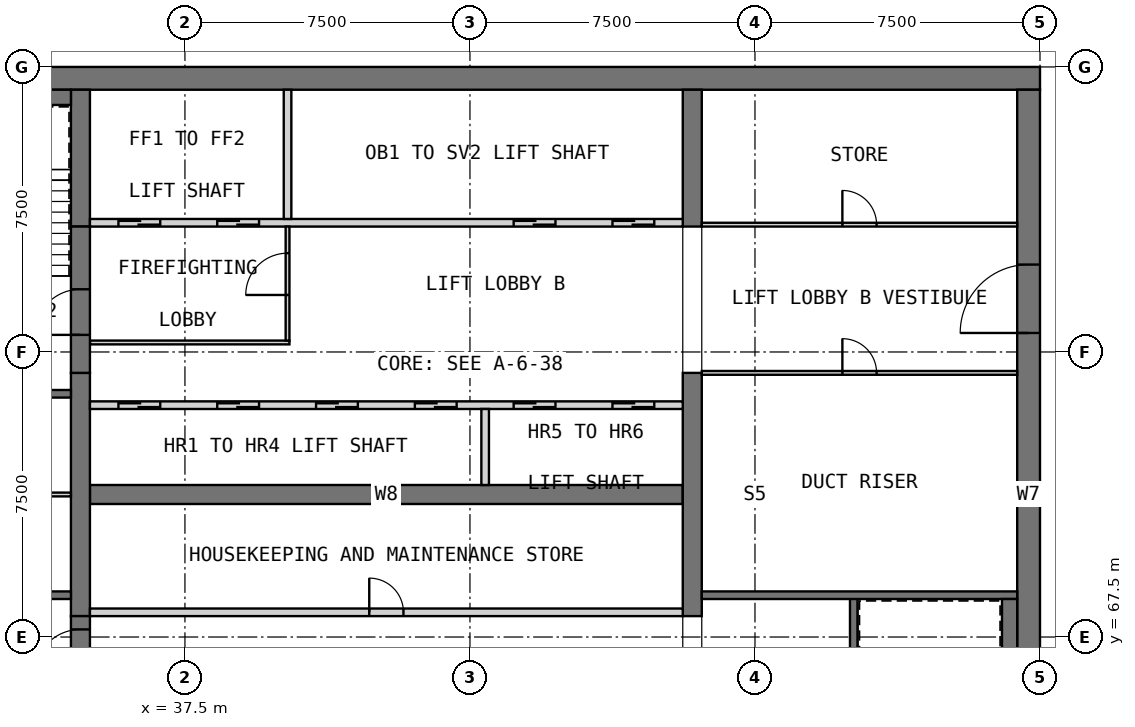
"""IFC4 building model, lengths in metres.
Left out: names, types, materials, properties, quantities, classifications, styles, units other than length and angle.
Written with IfcOpenShell. Run it as: python <this file> out.ifc"""

import sys

from ifc_helpers import new_model, si_unit, direction, frame, frame_2d, origin, place, context, subcontext, project, spatial, rectangle, extrude, element, fill, save


model = new_model("IFC4")
c1 = context("Model", 3, precision=1e-05, world=origin(), true_north=direction((0.0, 1.0)))
c2 = subcontext(c1, "Body", "Model", "MODEL_VIEW")
j1 = project(units=[si_unit("LENGTHUNIT", "METRE"), si_unit("PLANEANGLEUNIT", "RADIAN")], contexts=[c1])
p1 = place(None, origin())
s1 = spatial("IfcSite", under=j1, at=p1, CompositionType="ELEMENT")
p2 = place(p1, origin())
s2 = spatial("IfcBuilding", under=s1, at=p2, CompositionType="ELEMENT")
p3 = place(p2, frame((0.0, 0.0, 269.7)))
s3 = spatial("IfcBuildingStorey", under=s2, at=p3, CompositionType="ELEMENT", Elevation=269.7)
p4 = place(p3, frame((30.0, 82.2, 0.0), z_axis=(0.0, 0.0, 1.0), x_axis=(1.0, 0.0, 0.0)))
e1 = element("IfcWall", 1, at=p4, inside=s3, PredefinedType="SHEAR", context=c2, shape_type="SweptSolid", body=[
    extrude(rectangle(XDim=30.0, YDim=0.6, at=frame_2d((15.0, 0.0))), origin(), (0.0, 0.0, 1.0), 3.5),
])
p5 = place(p3, frame((59.7, 60.6, 0.0), z_axis=(0.0, 0.0, 1.0), x_axis=(0.0, 1.0, 0.0)))
e2 = element("IfcWall", 2, at=p5, inside=s3, PredefinedType="SHEAR", context=c2, shape_type="SweptSolid", body=[
    extrude(rectangle(XDim=21.3, YDim=0.6, at=frame_2d((10.65, 0.0))), origin(), (0.0, 0.0, 1.0), 3.5),
])
p6 = place(p5, frame((14.9, 0.0, 0.0)))
e3 = element("IfcOpeningElement", 3, at=p6, cuts=e2, PredefinedType="OPENING", context=c2, shape_type="SweptSolid", body=[
    extrude(rectangle(XDim=1.8, YDim=2.1, at=frame_2d((0.9, 1.05))), frame((0.0, 0.31, 0.0), z_axis=(0.0, -1.0, 0.0), x_axis=(1.0, 0.0, 0.0)), (0.0, 0.0, 1.0), 0.62),
])
p7 = place(p3, frame((35.0, 71.25, 0.0), z_axis=(0.0, 0.0, 1.0), x_axis=(1.0, 0.0, 0.0)))
e4 = element("IfcWall", 4, at=p7, inside=s3, PredefinedType="SHEAR", context=c2, shape_type="SweptSolid", body=[
    extrude(rectangle(XDim=15.6, YDim=0.5, at=frame_2d((7.8, 0.0))), origin(), (0.0, 0.0, 1.0), 3.5),
])
p8 = place(p3, frame((34.75, 68.05, 0.0), z_axis=(0.0, 0.0, 1.0), x_axis=(0.0, 1.0, 0.0)))
e5 = element("IfcWall", 5, at=p8, inside=s3, PredefinedType="SHEAR", context=c2, shape_type="SweptSolid", body=[
    extrude(rectangle(XDim=6.4, YDim=0.5, at=frame_2d((3.2, 0.0))), origin(), (0.0, 0.0, 1.0), 3.5),
])
p9 = place(p3, frame((34.75, 78.3, 0.0), z_axis=(0.0, 0.0, 1.0), x_axis=(0.0, 1.0, 0.0)))
e6 = element("IfcWall", 6, at=p9, inside=s3, PredefinedType="SHEAR", context=c2, shape_type="SweptSolid", body=[
    extrude(rectangle(XDim=3.6, YDim=0.5, at=frame_2d((1.8, 0.0))), origin(), (0.0, 0.0, 1.0), 3.5),
])
p10 = place(p3, frame((50.85, 68.05, 0.0), z_axis=(0.0, 0.0, 1.0), x_axis=(0.0, 1.0, 0.0)))
e7 = element("IfcWall", 7, at=p10, inside=s3, PredefinedType="SHEAR", context=c2, shape_type="SweptSolid", body=[
    extrude(rectangle(XDim=6.4, YDim=0.5, at=frame_2d((3.2, 0.0))), origin(), (0.0, 0.0, 1.0), 3.5),
])
p11 = place(p3, frame((50.85, 78.3, 0.0), z_axis=(0.0, 0.0, 1.0), x_axis=(0.0, 1.0, 0.0)))
e8 = element("IfcWall", 8, at=p11, inside=s3, PredefinedType="SHEAR", context=c2, shape_type="SweptSolid", body=[
    extrude(rectangle(XDim=3.6, YDim=0.5, at=frame_2d((1.8, 0.0))), origin(), (0.0, 0.0, 1.0), 3.5),
])
p12 = place(p3, frame((35.0, 68.15, 0.0), z_axis=(0.0, 0.0, 1.0), x_axis=(1.0, 0.0, 0.0)))
e9 = element("IfcWall", 9, at=p12, inside=s3, PredefinedType="PARTITIONING", context=c2, shape_type="SweptSolid", body=[
    extrude(rectangle(XDim=15.6, YDim=0.2, at=frame_2d((7.8, 0.0))), origin(), (0.0, 0.0, 1.0), 3.25),
])
p13 = place(p12, frame((7.35, 0.0, 0.0)))
e10 = element("IfcOpeningElement", 10, at=p13, cuts=e9, PredefinedType="OPENING", context=c2, shape_type="SweptSolid", body=[
    extrude(rectangle(XDim=0.9, YDim=2.1, at=frame_2d((0.45, 1.05))), frame((0.0, 0.11, 0.0), z_axis=(0.0, -1.0, 0.0), x_axis=(1.0, 0.0, 0.0)), (0.0, 0.0, 1.0), 0.22),
])
p14 = place(p3, frame((35.0, 73.6, 0.0), z_axis=(0.0, 0.0, 1.0), x_axis=(1.0, 0.0, 0.0)))
e11 = element("IfcWall", 11, at=p14, inside=s3, PredefinedType="SOLIDWALL", context=c2, shape_type="SweptSolid", body=[
    extrude(rectangle(XDim=15.6, YDim=0.2, at=frame_2d((7.8, 0.0))), origin(), (0.0, 0.0, 1.0), 3.5),
])
p15 = place(p14, frame((0.75, 0.0, 0.0)))
e12 = element("IfcOpeningElement", 12, at=p15, cuts=e11, PredefinedType="OPENING", context=c2, shape_type="SweptSolid", body=[
    extrude(rectangle(XDim=1.1, YDim=2.1, at=frame_2d((0.55, 1.05))), frame((0.0, 0.11, 0.0), z_axis=(0.0, -1.0, 0.0), x_axis=(1.0, 0.0, 0.0)), (0.0, 0.0, 1.0), 0.22),
])
p16 = place(p14, frame((3.35, 0.0, 0.0)))
e13 = element("IfcOpeningElement", 13, at=p16, cuts=e11, PredefinedType="OPENING", context=c2, shape_type="SweptSolid", body=[
    extrude(rectangle(XDim=1.1, YDim=2.1, at=frame_2d((0.55, 1.05))), frame((0.0, 0.11, 0.0), z_axis=(0.0, -1.0, 0.0), x_axis=(1.0, 0.0, 0.0)), (0.0, 0.0, 1.0), 0.22),
])
p17 = place(p14, frame((5.95, 0.0, 0.0)))
e14 = element("IfcOpeningElement", 14, at=p17, cuts=e11, PredefinedType="OPENING", context=c2, shape_type="SweptSolid", body=[
    extrude(rectangle(XDim=1.1, YDim=2.1, at=frame_2d((0.55, 1.05))), frame((0.0, 0.11, 0.0), z_axis=(0.0, -1.0, 0.0), x_axis=(1.0, 0.0, 0.0)), (0.0, 0.0, 1.0), 0.22),
])
p18 = place(p14, frame((8.55, 0.0, 0.0)))
e15 = element("IfcOpeningElement", 15, at=p18, cuts=e11, PredefinedType="OPENING", context=c2, shape_type="SweptSolid", body=[
    extrude(rectangle(XDim=1.1, YDim=2.1, at=frame_2d((0.55, 1.05))), frame((0.0, 0.11, 0.0), z_axis=(0.0, -1.0, 0.0), x_axis=(1.0, 0.0, 0.0)), (0.0, 0.0, 1.0), 0.22),
])
p19 = place(p14, frame((11.15, 0.0, 0.0)))
e16 = element("IfcOpeningElement", 16, at=p19, cuts=e11, PredefinedType="OPENING", context=c2, shape_type="SweptSolid", body=[
    extrude(rectangle(XDim=1.1, YDim=2.1, at=frame_2d((0.55, 1.05))), frame((0.0, 0.11, 0.0), z_axis=(0.0, -1.0, 0.0), x_axis=(1.0, 0.0, 0.0)), (0.0, 0.0, 1.0), 0.22),
])
p20 = place(p14, frame((13.75, 0.0, 0.0)))
e17 = element("IfcOpeningElement", 17, at=p20, cuts=e11, PredefinedType="OPENING", context=c2, shape_type="SweptSolid", body=[
    extrude(rectangle(XDim=1.1, YDim=2.1, at=frame_2d((0.55, 1.05))), frame((0.0, 0.11, 0.0), z_axis=(0.0, -1.0, 0.0), x_axis=(1.0, 0.0, 0.0)), (0.0, 0.0, 1.0), 0.22),
])
p21 = place(p3, frame((45.4, 71.5, 0.0), z_axis=(0.0, 0.0, 1.0), x_axis=(0.0, 1.0, 0.0)))
e18 = element("IfcWall", 18, at=p21, inside=s3, PredefinedType="SOLIDWALL", context=c2, shape_type="SweptSolid", body=[
    extrude(rectangle(XDim=2.0, YDim=0.2, at=frame_2d((1.0, 0.0))), origin(), (0.0, 0.0, 1.0), 3.5),
])
p22 = place(p3, frame((35.0, 78.4, 0.0), z_axis=(0.0, 0.0, 1.0), x_axis=(1.0, 0.0, 0.0)))
e19 = element("IfcWall", 19, at=p22, inside=s3, PredefinedType="SOLIDWALL", context=c2, shape_type="SweptSolid", body=[
    extrude(rectangle(XDim=15.6, YDim=0.2, at=frame_2d((7.8, 0.0))), origin(), (0.0, 0.0, 1.0), 3.5),
])
p23 = place(p22, frame((0.75, 0.0, 0.0)))
e20 = element("IfcOpeningElement", 20, at=p23, cuts=e19, PredefinedType="OPENING", context=c2, shape_type="SweptSolid", body=[
    extrude(rectangle(XDim=1.1, YDim=2.1, at=frame_2d((0.55, 1.05))), frame((0.0, 0.11, 0.0), z_axis=(0.0, -1.0, 0.0), x_axis=(1.0, 0.0, 0.0)), (0.0, 0.0, 1.0), 0.22),
])
p24 = place(p22, frame((3.35, 0.0, 0.0)))
e21 = element("IfcOpeningElement", 21, at=p24, cuts=e19, PredefinedType="OPENING", context=c2, shape_type="SweptSolid", body=[
    extrude(rectangle(XDim=1.1, YDim=2.1, at=frame_2d((0.55, 1.05))), frame((0.0, 0.11, 0.0), z_axis=(0.0, -1.0, 0.0), x_axis=(1.0, 0.0, 0.0)), (0.0, 0.0, 1.0), 0.22),
])
p25 = place(p22, frame((11.15, 0.0, 0.0)))
e22 = element("IfcOpeningElement", 22, at=p25, cuts=e19, PredefinedType="OPENING", context=c2, shape_type="SweptSolid", body=[
    extrude(rectangle(XDim=1.1, YDim=2.1, at=frame_2d((0.55, 1.05))), frame((0.0, 0.11, 0.0), z_axis=(0.0, -1.0, 0.0), x_axis=(1.0, 0.0, 0.0)), (0.0, 0.0, 1.0), 0.22),
])
p26 = place(p22, frame((13.75, 0.0, 0.0)))
e23 = element("IfcOpeningElement", 23, at=p26, cuts=e19, PredefinedType="OPENING", context=c2, shape_type="SweptSolid", body=[
    extrude(rectangle(XDim=1.1, YDim=2.1, at=frame_2d((0.55, 1.05))), frame((0.0, 0.11, 0.0), z_axis=(0.0, -1.0, 0.0), x_axis=(1.0, 0.0, 0.0)), (0.0, 0.0, 1.0), 0.22),
])
p27 = place(p3, frame((40.2, 78.5, 0.0), z_axis=(0.0, 0.0, 1.0), x_axis=(0.0, 1.0, 0.0)))
e24 = element("IfcWall", 24, at=p27, inside=s3, PredefinedType="SOLIDWALL", context=c2, shape_type="SweptSolid", body=[
    extrude(rectangle(XDim=3.4, YDim=0.2, at=frame_2d((1.7, 0.0))), origin(), (0.0, 0.0, 1.0), 3.5),
])
p28 = place(p3, frame((35.0, 75.25, 0.0), z_axis=(0.0, 0.0, 1.0), x_axis=(1.0, 0.0, 0.0)))
e25 = element("IfcWall", 25, at=p28, inside=s3, PredefinedType="PARTITIONING", context=c2, shape_type="SweptSolid", body=[
    extrude(rectangle(XDim=5.25, YDim=0.1, at=frame_2d((2.625, 0.0))), origin(), (0.0, 0.0, 1.0), 3.25),
])
p29 = place(p3, frame((40.2, 75.3, 0.0), z_axis=(0.0, 0.0, 1.0), x_axis=(0.0, 1.0, 0.0)))
e26 = element("IfcWall", 26, at=p29, inside=s3, PredefinedType="PARTITIONING", context=c2, shape_type="SweptSolid", body=[
    extrude(rectangle(XDim=3.0, YDim=0.1, at=frame_2d((1.5, 0.0))), origin(), (0.0, 0.0, 1.0), 3.25),
])
p30 = place(p29, frame((1.2, 0.0, 0.0)))
e27 = element("IfcOpeningElement", 27, at=p30, cuts=e26, PredefinedType="OPENING", context=c2, shape_type="SweptSolid", body=[
    extrude(rectangle(XDim=1.1, YDim=2.1, at=frame_2d((0.55, 1.05))), frame((0.0, 0.06, 0.0), z_axis=(0.0, -1.0, 0.0), x_axis=(1.0, 0.0, 0.0)), (0.0, 0.0, 1.0), 0.12),
])
p31 = place(p3, frame((34.75, 64.2, 0.0), z_axis=(0.0, 0.0, 1.0), x_axis=(0.0, 1.0, 0.0)))
e28 = element("IfcWall", 28, at=p31, inside=s3, PredefinedType="SOLIDWALL", context=c2, shape_type="SweptSolid", body=[
    extrude(rectangle(XDim=3.85, YDim=0.5, at=frame_2d((1.925, 0.0))), origin(), (0.0, 0.0, 1.0), 2.3),
])
p32 = place(p31, frame((2.3, 0.0, 0.0)))
e29 = element("IfcOpeningElement", 29, at=p32, cuts=e28, PredefinedType="OPENING", context=c2, shape_type="SweptSolid", body=[
    extrude(rectangle(XDim=1.2, YDim=2.1, at=frame_2d((0.6, 1.05))), frame((0.0, 0.26, 0.0), z_axis=(0.0, -1.0, 0.0), x_axis=(1.0, 0.0, 0.0)), (0.0, 0.0, 1.0), 0.52),
])
p33 = place(p3, frame((34.75, 74.45, 0.0), z_axis=(0.0, 0.0, 1.0), x_axis=(0.0, 1.0, 0.0)))
e30 = element("IfcWall", 30, at=p33, inside=s3, PredefinedType="SOLIDWALL", context=c2, shape_type="SweptSolid", body=[
    extrude(rectangle(XDim=3.85, YDim=0.5, at=frame_2d((1.925, 0.0))), origin(), (0.0, 0.0, 1.0), 2.3),
])
p34 = place(p33, frame((1.0, 0.0, 0.0)))
e31 = element("IfcOpeningElement", 31, at=p34, cuts=e30, PredefinedType="OPENING", context=c2, shape_type="SweptSolid", body=[
    extrude(rectangle(XDim=1.2, YDim=2.1, at=frame_2d((0.6, 1.05))), frame((0.0, 0.26, 0.0), z_axis=(0.0, -1.0, 0.0), x_axis=(1.0, 0.0, 0.0)), (0.0, 0.0, 1.0), 0.52),
])
p35 = place(p3, frame((30.6, 68.6, 0.0), z_axis=(0.0, 0.0, 1.0), x_axis=(1.0, 0.0, 0.0)))
e32 = element("IfcWall", 32, at=p35, inside=s3, PredefinedType="SOLIDWALL", context=c2, shape_type="SweptSolid", body=[
    extrude(rectangle(XDim=3.9, YDim=0.2, at=frame_2d((1.95, 0.0))), origin(), (0.0, 0.0, 1.0), 3.25),
])
p36 = place(p35, frame((1.7, 0.0, 0.0)))
e33 = element("IfcOpeningElement", 33, at=p36, cuts=e32, PredefinedType="OPENING", context=c2, shape_type="SweptSolid", body=[
    extrude(rectangle(XDim=0.9, YDim=2.1, at=frame_2d((0.45, 1.05))), frame((0.0, 0.11, 0.0), z_axis=(0.0, -1.0, 0.0), x_axis=(1.0, 0.0, 0.0)), (0.0, 0.0, 1.0), 0.22),
])
p37 = place(p3, frame((30.6, 73.9, 0.0), z_axis=(0.0, 0.0, 1.0), x_axis=(1.0, 0.0, 0.0)))
e34 = element("IfcWall", 34, at=p37, inside=s3, PredefinedType="SOLIDWALL", context=c2, shape_type="SweptSolid", body=[
    extrude(rectangle(XDim=3.9, YDim=0.2, at=frame_2d((1.95, 0.0))), origin(), (0.0, 0.0, 1.0), 3.25),
])
p38 = place(p37, frame((1.7, 0.0, 0.0)))
e35 = element("IfcOpeningElement", 35, at=p38, cuts=e34, PredefinedType="OPENING", context=c2, shape_type="SweptSolid", body=[
    extrude(rectangle(XDim=0.9, YDim=2.1, at=frame_2d((0.45, 1.05))), frame((0.0, 0.11, 0.0), z_axis=(0.0, -1.0, 0.0), x_axis=(1.0, 0.0, 0.0)), (0.0, 0.0, 1.0), 0.22),
])
p39 = place(p3, frame((55.1, 60.6, 0.0), z_axis=(0.0, 0.0, 1.0), x_axis=(0.0, 1.0, 0.0)))
e36 = element("IfcWall", 36, at=p39, inside=s3, PredefinedType="SOLIDWALL", context=c2, shape_type="SweptSolid", body=[
    extrude(rectangle(XDim=8.0, YDim=0.2, at=frame_2d((4.0, 0.0))), origin(), (0.0, 0.0, 1.0), 3.25),
])
p40 = place(p3, frame((51.1, 68.6, 0.0), z_axis=(0.0, 0.0, 1.0), x_axis=(1.0, 0.0, 0.0)))
e37 = element("IfcWall", 37, at=p40, inside=s3, PredefinedType="SOLIDWALL", context=c2, shape_type="SweptSolid", body=[
    extrude(rectangle(XDim=8.3, YDim=0.2, at=frame_2d((4.15, 0.0))), origin(), (0.0, 0.0, 1.0), 3.25),
])
p41 = place(p3, frame((31.0, 81.7, 0.0), z_axis=(0.0, 0.0, 1.0), x_axis=(1.0, 0.0, 0.0)))
e38 = element("IfcWall", 38, at=p41, inside=s3, PredefinedType="SOLIDWALL", context=c2, shape_type="SweptSolid", body=[
    extrude(rectangle(XDim=3.5, YDim=0.4, at=frame_2d((1.75, 0.0))), origin(), (0.0, 0.0, 1.0), 3.25),
])
p42 = place(p3, frame((59.2, 60.6, 0.0), z_axis=(0.0, 0.0, 1.0), x_axis=(0.0, 1.0, 0.0)))
e39 = element("IfcWall", 39, at=p42, inside=s3, PredefinedType="SOLIDWALL", context=c2, shape_type="SweptSolid", body=[
    extrude(rectangle(XDim=7.9, YDim=0.4, at=frame_2d((3.95, 0.0))), origin(), (0.0, 0.0, 1.0), 3.25),
])
p43 = place(p3, frame((30.6, 71.25, 0.0), z_axis=(0.0, 0.0, 1.0), x_axis=(1.0, 0.0, 0.0)))
e40 = element("IfcWall", 40, at=p43, inside=s3, PredefinedType="PARTITIONING", context=c2, shape_type="SweptSolid", body=[
    extrude(rectangle(XDim=3.9, YDim=0.1, at=frame_2d((1.95, 0.0))), origin(), (0.0, 0.0, 1.0), 3.25),
])
p44 = place(p3, frame((51.1, 74.45, 0.0), z_axis=(0.0, 0.0, 1.0), x_axis=(1.0, 0.0, 0.0)))
e41 = element("IfcWall", 41, at=p44, inside=s3, PredefinedType="PARTITIONING", context=c2, shape_type="SweptSolid", body=[
    extrude(rectangle(XDim=8.3, YDim=0.1, at=frame_2d((4.15, 0.0))), origin(), (0.0, 0.0, 1.0), 3.25),
])
p45 = place(p44, frame((3.7, 0.0, 0.0)))
e42 = element("IfcOpeningElement", 42, at=p45, cuts=e41, PredefinedType="OPENING", context=c2, shape_type="SweptSolid", body=[
    extrude(rectangle(XDim=0.9, YDim=2.1, at=frame_2d((0.45, 1.05))), frame((0.0, 0.06, 0.0), z_axis=(0.0, -1.0, 0.0), x_axis=(1.0, 0.0, 0.0)), (0.0, 0.0, 1.0), 0.12),
])
p46 = place(p3, frame((51.1, 78.35, 0.0), z_axis=(0.0, 0.0, 1.0), x_axis=(1.0, 0.0, 0.0)))
e43 = element("IfcWall", 43, at=p46, inside=s3, PredefinedType="PARTITIONING", context=c2, shape_type="SweptSolid", body=[
    extrude(rectangle(XDim=8.3, YDim=0.1, at=frame_2d((4.15, 0.0))), origin(), (0.0, 0.0, 1.0), 3.25),
])
p47 = place(p46, frame((3.7, 0.0, 0.0)))
e44 = element("IfcOpeningElement", 44, at=p47, cuts=e43, PredefinedType="OPENING", context=c2, shape_type="SweptSolid", body=[
    extrude(rectangle(XDim=0.9, YDim=2.1, at=frame_2d((0.45, 1.05))), frame((0.0, 0.06, 0.0), z_axis=(0.0, -1.0, 0.0), x_axis=(1.0, 0.0, 0.0)), (0.0, 0.0, 1.0), 0.12),
])
p48 = place(p13, origin())
e45 = element("IfcDoor", 45, at=p48, inside=s3, OperationType="SINGLE_SWING_LEFT", PredefinedType="DOOR", context=c2, shape_type="SweptSolid", body=[
    extrude(rectangle(XDim=0.9, YDim=2.1, at=frame_2d((0.45, 1.05))), frame((0.0, 0.025, 0.0), z_axis=(0.0, -1.0, 0.0), x_axis=(1.0, 0.0, 0.0)), (0.0, 0.0, 1.0), 0.05),
])
fill(e10, e45)
p49 = place(p15, origin())
e46 = element("IfcDoor", 46, at=p49, inside=s3, OperationType="DOUBLE_DOOR_SLIDING", PredefinedType="DOOR", context=c2, shape_type="SweptSolid", body=[
    extrude(rectangle(XDim=1.1, YDim=2.1, at=frame_2d((0.55, 1.05))), frame((0.0, 0.025, 0.0), z_axis=(0.0, -1.0, 0.0), x_axis=(1.0, 0.0, 0.0)), (0.0, 0.0, 1.0), 0.05),
])
fill(e12, e46)
p50 = place(p16, origin())
e47 = element("IfcDoor", 47, at=p50, inside=s3, OperationType="DOUBLE_DOOR_SLIDING", PredefinedType="DOOR", context=c2, shape_type="SweptSolid", body=[
    extrude(rectangle(XDim=1.1, YDim=2.1, at=frame_2d((0.55, 1.05))), frame((0.0, 0.025, 0.0), z_axis=(0.0, -1.0, 0.0), x_axis=(1.0, 0.0, 0.0)), (0.0, 0.0, 1.0), 0.05),
])
fill(e13, e47)
p51 = place(p17, origin())
e48 = element("IfcDoor", 48, at=p51, inside=s3, OperationType="DOUBLE_DOOR_SLIDING", PredefinedType="DOOR", context=c2, shape_type="SweptSolid", body=[
    extrude(rectangle(XDim=1.1, YDim=2.1, at=frame_2d((0.55, 1.05))), frame((0.0, 0.025, 0.0), z_axis=(0.0, -1.0, 0.0), x_axis=(1.0, 0.0, 0.0)), (0.0, 0.0, 1.0), 0.05),
])
fill(e14, e48)
p52 = place(p18, origin())
e49 = element("IfcDoor", 49, at=p52, inside=s3, OperationType="DOUBLE_DOOR_SLIDING", PredefinedType="DOOR", context=c2, shape_type="SweptSolid", body=[
    extrude(rectangle(XDim=1.1, YDim=2.1, at=frame_2d((0.55, 1.05))), frame((0.0, 0.025, 0.0), z_axis=(0.0, -1.0, 0.0), x_axis=(1.0, 0.0, 0.0)), (0.0, 0.0, 1.0), 0.05),
])
fill(e15, e49)
p53 = place(p19, origin())
e50 = element("IfcDoor", 50, at=p53, inside=s3, OperationType="DOUBLE_DOOR_SLIDING", PredefinedType="DOOR", context=c2, shape_type="SweptSolid", body=[
    extrude(rectangle(XDim=1.1, YDim=2.1, at=frame_2d((0.55, 1.05))), frame((0.0, 0.025, 0.0), z_axis=(0.0, -1.0, 0.0), x_axis=(1.0, 0.0, 0.0)), (0.0, 0.0, 1.0), 0.05),
])
fill(e16, e50)
p54 = place(p20, origin())
e51 = element("IfcDoor", 51, at=p54, inside=s3, OperationType="DOUBLE_DOOR_SLIDING", PredefinedType="DOOR", context=c2, shape_type="SweptSolid", body=[
    extrude(rectangle(XDim=1.1, YDim=2.1, at=frame_2d((0.55, 1.05))), frame((0.0, 0.025, 0.0), z_axis=(0.0, -1.0, 0.0), x_axis=(1.0, 0.0, 0.0)), (0.0, 0.0, 1.0), 0.05),
])
fill(e17, e51)
p55 = place(p23, origin())
e52 = element("IfcDoor", 52, at=p55, inside=s3, OperationType="DOUBLE_DOOR_SLIDING", PredefinedType="DOOR", context=c2, shape_type="SweptSolid", body=[
    extrude(rectangle(XDim=1.1, YDim=2.1, at=frame_2d((0.55, 1.05))), frame((0.0, 0.025, 0.0), z_axis=(0.0, -1.0, 0.0), x_axis=(1.0, 0.0, 0.0)), (0.0, 0.0, 1.0), 0.05),
])
fill(e20, e52)
p56 = place(p24, origin())
e53 = element("IfcDoor", 53, at=p56, inside=s3, OperationType="DOUBLE_DOOR_SLIDING", PredefinedType="DOOR", context=c2, shape_type="SweptSolid", body=[
    extrude(rectangle(XDim=1.1, YDim=2.1, at=frame_2d((0.55, 1.05))), frame((0.0, 0.025, 0.0), z_axis=(0.0, -1.0, 0.0), x_axis=(1.0, 0.0, 0.0)), (0.0, 0.0, 1.0), 0.05),
])
fill(e21, e53)
p57 = place(p25, origin())
e54 = element("IfcDoor", 54, at=p57, inside=s3, OperationType="DOUBLE_DOOR_SLIDING", PredefinedType="DOOR", context=c2, shape_type="SweptSolid", body=[
    extrude(rectangle(XDim=1.1, YDim=2.1, at=frame_2d((0.55, 1.05))), frame((0.0, 0.025, 0.0), z_axis=(0.0, -1.0, 0.0), x_axis=(1.0, 0.0, 0.0)), (0.0, 0.0, 1.0), 0.05),
])
fill(e22, e54)
p58 = place(p26, origin())
e55 = element("IfcDoor", 55, at=p58, inside=s3, OperationType="DOUBLE_DOOR_SLIDING", PredefinedType="DOOR", context=c2, shape_type="SweptSolid", body=[
    extrude(rectangle(XDim=1.1, YDim=2.1, at=frame_2d((0.55, 1.05))), frame((0.0, 0.025, 0.0), z_axis=(0.0, -1.0, 0.0), x_axis=(1.0, 0.0, 0.0)), (0.0, 0.0, 1.0), 0.05),
])
fill(e23, e55)
p59 = place(p6, origin())
e56 = element("IfcDoor", 56, at=p59, inside=s3, OperationType="DOUBLE_DOOR_SINGLE_SWING", PredefinedType="DOOR", context=c2, shape_type="SweptSolid", body=[
    extrude(rectangle(XDim=1.8, YDim=2.1, at=frame_2d((0.9, 1.05))), frame((0.0, 0.025, 0.0), z_axis=(0.0, -1.0, 0.0), x_axis=(1.0, 0.0, 0.0)), (0.0, 0.0, 1.0), 0.05),
])
fill(e3, e56)
p60 = place(p30, origin())
e57 = element("IfcDoor", 57, at=p60, inside=s3, OperationType="SINGLE_SWING_LEFT", PredefinedType="DOOR", context=c2, shape_type="SweptSolid", body=[
    extrude(rectangle(XDim=1.1, YDim=2.1, at=frame_2d((0.55, 1.05))), frame((0.0, 0.025, 0.0), z_axis=(0.0, -1.0, 0.0), x_axis=(1.0, 0.0, 0.0)), (0.0, 0.0, 1.0), 0.05),
])
fill(e27, e57)
p61 = place(p32, origin())
e58 = element("IfcDoor", 58, at=p61, inside=s3, OperationType="SINGLE_SWING_LEFT", PredefinedType="DOOR", context=c2, shape_type="SweptSolid", body=[
    extrude(rectangle(XDim=1.2, YDim=2.1, at=frame_2d((0.6, 1.05))), frame((0.0, 0.025, 0.0), z_axis=(0.0, -1.0, 0.0), x_axis=(1.0, 0.0, 0.0)), (0.0, 0.0, 1.0), 0.05),
])
fill(e29, e58)
p62 = place(p34, origin())
e59 = element("IfcDoor", 59, at=p62, inside=s3, OperationType="SINGLE_SWING_RIGHT", PredefinedType="DOOR", context=c2, shape_type="SweptSolid", body=[
    extrude(rectangle(XDim=1.2, YDim=2.1, at=frame_2d((0.6, 1.05))), frame((0.0, 0.025, 0.0), z_axis=(0.0, -1.0, 0.0), x_axis=(1.0, 0.0, 0.0)), (0.0, 0.0, 1.0), 0.05),
])
fill(e31, e59)
p63 = place(p45, origin())
e60 = element("IfcDoor", 60, at=p63, inside=s3, OperationType="SINGLE_SWING_LEFT", PredefinedType="DOOR", context=c2, shape_type="SweptSolid", body=[
    extrude(rectangle(XDim=0.9, YDim=2.1, at=frame_2d((0.45, 1.05))), frame((0.0, 0.025, 0.0), z_axis=(0.0, -1.0, 0.0), x_axis=(1.0, 0.0, 0.0)), (0.0, 0.0, 1.0), 0.05),
])
fill(e42, e60)
p64 = place(p47, origin())
e61 = element("IfcDoor", 61, at=p64, inside=s3, OperationType="SINGLE_SWING_LEFT", PredefinedType="DOOR", context=c2, shape_type="SweptSolid", body=[
    extrude(rectangle(XDim=0.9, YDim=2.1, at=frame_2d((0.45, 1.05))), frame((0.0, 0.025, 0.0), z_axis=(0.0, -1.0, 0.0), x_axis=(1.0, 0.0, 0.0)), (0.0, 0.0, 1.0), 0.05),
])
fill(e44, e61)
save(model, sys.argv[1])
